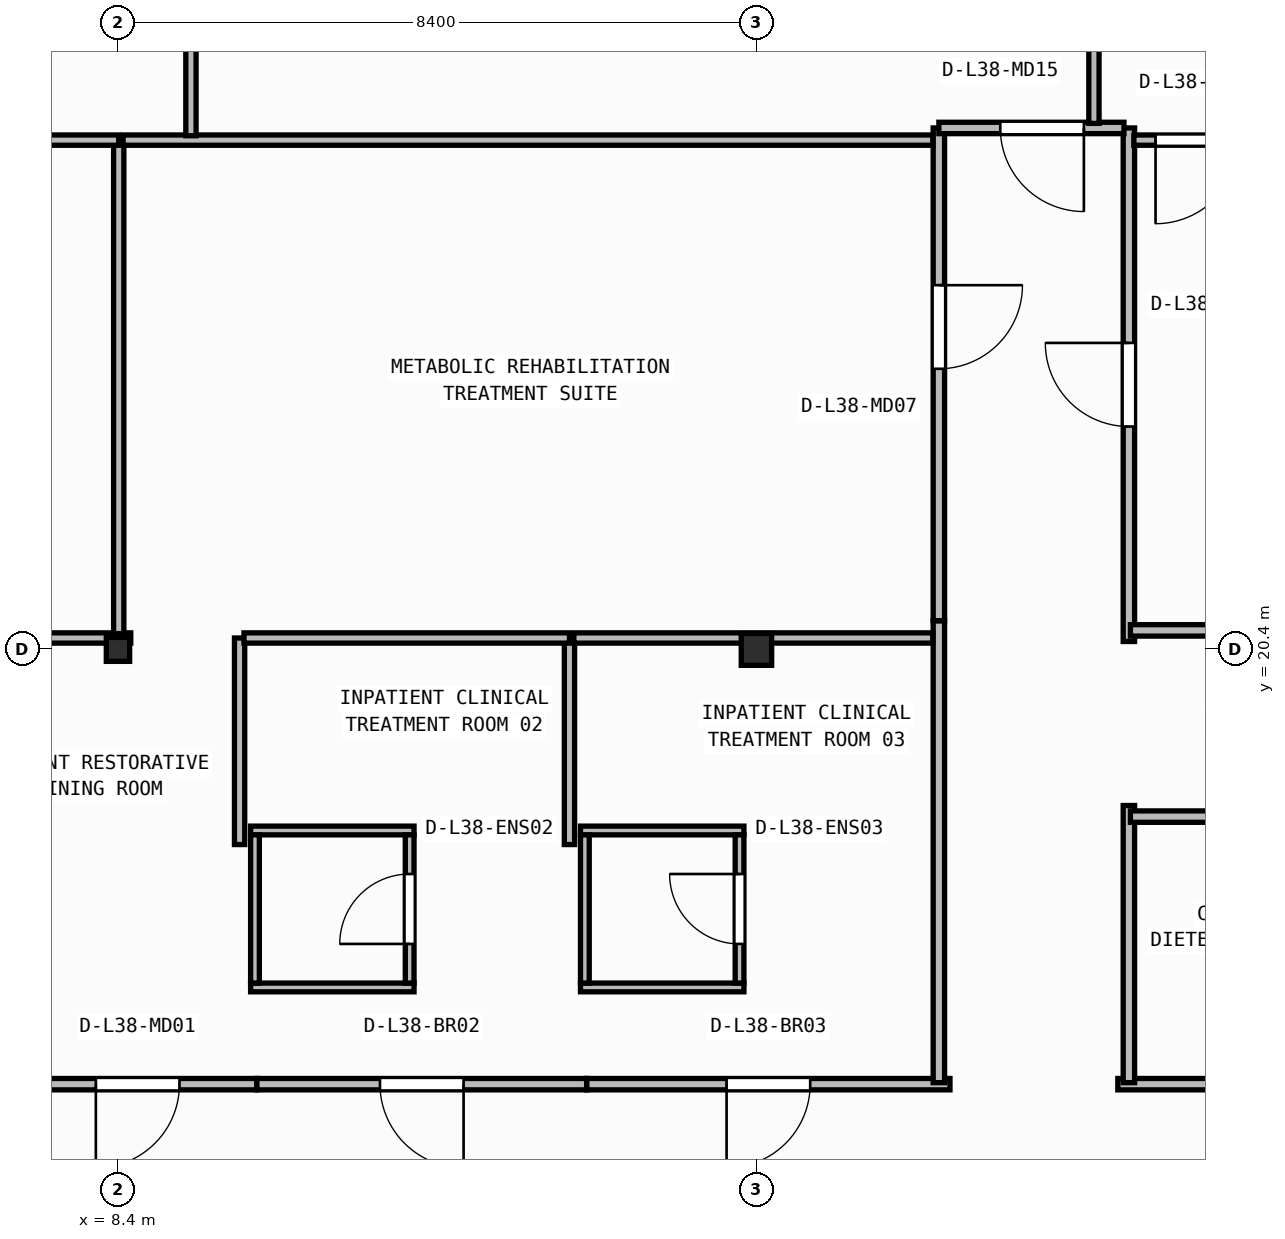
"""IFC4 building model, lengths in metres.
Left out: names, types, materials, properties, quantities, classifications, styles, units other than length and angle.
Written with IfcOpenShell. Run it as: python <this file> out.ifc"""

import sys

from ifc_helpers import new_model, si_unit, direction, frame, frame_2d, origin, origin_2d, place, context, subcontext, project, spatial, rectangle, i_section, extrude, element, fill, save


model = new_model("IFC4")
c1 = context("Model", 3, precision=1e-05, world=origin(), true_north=direction((0.0, 1.0)))
c2 = subcontext(c1, "Body", "Model", "MODEL_VIEW")
j1 = project(units=[si_unit("LENGTHUNIT", "METRE"), si_unit("PLANEANGLEUNIT", "RADIAN")], contexts=[c1])
p1 = place(None, origin())
s1 = spatial("IfcSite", under=j1, at=p1, CompositionType="ELEMENT")
p2 = place(p1, origin())
s2 = spatial("IfcBuilding", under=s1, at=p2, CompositionType="ELEMENT")
p3 = place(p2, frame((0.0, 0.0, 154.7)))
s3 = spatial("IfcBuildingStorey", under=s2, at=p3, CompositionType="ELEMENT", Elevation=154.7)
p4 = place(p3, frame((8.4, 20.4, 0.0), z_axis=(0.0, 0.0, 1.0), x_axis=(1.0, 0.0, 0.0)))
e1 = element("IfcColumn", 1, at=p4, inside=s3, PredefinedType="COLUMN", context=c2, shape_type="SweptSolid", body=[
    extrude(i_section(OverallWidth=0.307, OverallDepth=0.315, WebThickness=0.012, FlangeThickness=0.019, FilletRadius=0.017, at=origin_2d()), origin(), (0.0, 0.0, 1.0), 3.95),
])
p5 = place(p3, frame((16.8, 20.4, 0.0), z_axis=(0.0, 0.0, 1.0), x_axis=(1.0, 0.0, 0.0)))
e2 = element("IfcColumn", 2, at=p5, inside=s3, PredefinedType="COLUMN", context=c2, shape_type="SweptSolid", body=[
    extrude(i_section(OverallWidth=0.4, OverallDepth=0.42, WebThickness=0.025, FlangeThickness=0.04, at=origin_2d()), origin(), (0.0, 0.0, 1.0), 3.95),
])
for number, where, z_axis, x_axis in (
    (3, (10.145, 15.952, 0.0), (0.0, 0.0, 1.0), (1.0, 0.0, 0.0)),
    (4, (10.145, 18.018, 0.0), (0.0, 0.0, 1.0), (1.0, 0.0, 0.0)),
):
    element("IfcWall", number, at=place(p3, frame(where, z_axis=z_axis, x_axis=x_axis)), inside=s3, PredefinedType="PARTITIONING", context=c2, shape_type="SweptSolid", body=[
        extrude(rectangle(XDim=2.15, YDim=0.115, at=frame_2d((1.075, 0.0))), origin(), (0.0, 0.0, 1.0), 3.71),
    ])
p6 = place(p3, frame((10.202, 16.01, 0.0), z_axis=(0.0, 0.0, 1.0), x_axis=(0.0, 1.0, 0.0)))
e5 = element("IfcWall", 5, at=p6, inside=s3, PredefinedType="PARTITIONING", context=c2, shape_type="SweptSolid", body=[
    extrude(rectangle(XDim=1.95, YDim=0.115, at=frame_2d((0.975, 0.0))), origin(), (0.0, 0.0, 1.0), 3.71),
])
p7 = place(p3, frame((12.238, 16.01, 0.0), z_axis=(0.0, 0.0, 1.0), x_axis=(0.0, 1.0, 0.0)))
e6 = element("IfcWall", 6, at=p7, inside=s3, PredefinedType="PARTITIONING", context=c2, shape_type="SweptSolid", body=[
    extrude(rectangle(XDim=1.95, YDim=0.115, at=frame_2d((0.975, 0.0))), origin(), (0.0, 0.0, 1.0), 3.71),
])
p8 = place(p7, frame((0.515, 0.0, 0.0)))
e7 = element("IfcOpeningElement", 7, at=p8, cuts=e6, PredefinedType="OPENING", context=c2, shape_type="SweptSolid", body=[
    extrude(rectangle(XDim=0.92, YDim=2.1, at=frame_2d((0.46, 1.05))), frame((0.0, 0.067, 0.0), z_axis=(0.0, -1.0, 0.0), x_axis=(1.0, 0.0, 0.0)), (0.0, 0.0, 1.0), 0.135),
])
for number, where, z_axis, x_axis in (
    (8, (14.485, 15.952, 0.0), (0.0, 0.0, 1.0), (1.0, 0.0, 0.0)),
    (9, (14.485, 18.018, 0.0), (0.0, 0.0, 1.0), (1.0, 0.0, 0.0)),
):
    element("IfcWall", number, at=place(p3, frame(where, z_axis=z_axis, x_axis=x_axis)), inside=s3, PredefinedType="PARTITIONING", context=c2, shape_type="SweptSolid", body=[
        extrude(rectangle(XDim=2.15, YDim=0.115, at=frame_2d((1.075, 0.0))), origin(), (0.0, 0.0, 1.0), 3.71),
    ])
p9 = place(p3, frame((14.542, 16.01, 0.0), z_axis=(0.0, 0.0, 1.0), x_axis=(0.0, 1.0, 0.0)))
e10 = element("IfcWall", 10, at=p9, inside=s3, PredefinedType="PARTITIONING", context=c2, shape_type="SweptSolid", body=[
    extrude(rectangle(XDim=1.95, YDim=0.115, at=frame_2d((0.975, 0.0))), origin(), (0.0, 0.0, 1.0), 3.71),
])
p10 = place(p3, frame((16.577, 16.01, 0.0), z_axis=(0.0, 0.0, 1.0), x_axis=(0.0, 1.0, 0.0)))
e11 = element("IfcWall", 11, at=p10, inside=s3, PredefinedType="PARTITIONING", context=c2, shape_type="SweptSolid", body=[
    extrude(rectangle(XDim=1.95, YDim=0.115, at=frame_2d((0.975, 0.0))), origin(), (0.0, 0.0, 1.0), 3.71),
])
p11 = place(p10, frame((0.515, 0.0, 0.0)))
e12 = element("IfcOpeningElement", 12, at=p11, cuts=e11, PredefinedType="OPENING", context=c2, shape_type="SweptSolid", body=[
    extrude(rectangle(XDim=0.92, YDim=2.1, at=frame_2d((0.46, 1.05))), frame((0.0, 0.067, 0.0), z_axis=(0.0, -1.0, 0.0), x_axis=(1.0, 0.0, 0.0)), (0.0, 0.0, 1.0), 0.135),
])
p12 = place(p3, frame((10.226, 14.68, 0.0), z_axis=(0.0, 0.0, 1.0), x_axis=(-1.0, 0.0, 0.0)))
e13 = element("IfcWall", 13, at=p12, inside=s3, PredefinedType="PARTITIONING", context=c2, shape_type="SweptSolid", body=[
    extrude(rectangle(XDim=3.134, YDim=0.15, at=frame_2d((1.567, 0.0))), origin(), (0.0, 0.0, 1.0), 3.71),
])
p13 = place(p12, frame((1.017, 0.0, 0.0)))
e14 = element("IfcOpeningElement", 14, at=p13, cuts=e13, PredefinedType="OPENING", context=c2, shape_type="SweptSolid", body=[
    extrude(rectangle(XDim=1.1, YDim=2.1, at=frame_2d((0.55, 1.05))), frame((0.0, 0.085, 0.0), z_axis=(0.0, -1.0, 0.0), x_axis=(1.0, 0.0, 0.0)), (0.0, 0.0, 1.0), 0.17),
])
p14 = place(p3, frame((14.566, 14.68, 0.0), z_axis=(0.0, 0.0, 1.0), x_axis=(-1.0, 0.0, 0.0)))
e15 = element("IfcWall", 15, at=p14, inside=s3, PredefinedType="PARTITIONING", context=c2, shape_type="SweptSolid", body=[
    extrude(rectangle(XDim=4.338, YDim=0.15, at=frame_2d((2.169, 0.0))), origin(), (0.0, 0.0, 1.0), 3.71),
])
p15 = place(p14, frame((1.619, 0.0, 0.0)))
e16 = element("IfcOpeningElement", 16, at=p15, cuts=e15, PredefinedType="OPENING", context=c2, shape_type="SweptSolid", body=[
    extrude(rectangle(XDim=1.1, YDim=2.1, at=frame_2d((0.55, 1.05))), frame((0.0, 0.085, 0.0), z_axis=(0.0, -1.0, 0.0), x_axis=(1.0, 0.0, 0.0)), (0.0, 0.0, 1.0), 0.17),
])
p16 = place(p3, frame((19.346, 14.68, 0.0), z_axis=(0.0, 0.0, 1.0), x_axis=(-1.0, 0.0, 0.0)))
e17 = element("IfcWall", 17, at=p16, inside=s3, PredefinedType="PARTITIONING", context=c2, shape_type="SweptSolid", body=[
    extrude(rectangle(XDim=4.778, YDim=0.15, at=frame_2d((2.389, 0.0))), origin(), (0.0, 0.0, 1.0), 3.71),
])
p17 = place(p16, frame((1.839, 0.0, 0.0)))
e18 = element("IfcOpeningElement", 18, at=p17, cuts=e17, PredefinedType="OPENING", context=c2, shape_type="SweptSolid", body=[
    extrude(rectangle(XDim=1.1, YDim=2.1, at=frame_2d((0.55, 1.05))), frame((0.0, 0.085, 0.0), z_axis=(0.0, -1.0, 0.0), x_axis=(1.0, 0.0, 0.0)), (0.0, 0.0, 1.0), 0.17),
])
p18 = place(p3, frame((29.806, 14.68, 0.0), z_axis=(0.0, 0.0, 1.0), x_axis=(-1.0, 0.0, 0.0)))
e19 = element("IfcWall", 19, at=p18, inside=s3, PredefinedType="PARTITIONING", context=c2, shape_type="SweptSolid", body=[
    extrude(rectangle(XDim=8.252, YDim=0.15, at=frame_2d((4.126, 0.0))), origin(), (0.0, 0.0, 1.0), 3.71),
])
p19 = place(p18, frame((3.576, 0.0, 0.0)))
e20 = element("IfcOpeningElement", 20, at=p19, cuts=e19, PredefinedType="OPENING", context=c2, shape_type="SweptSolid", body=[
    extrude(rectangle(XDim=1.1, YDim=2.1, at=frame_2d((0.55, 1.05))), frame((0.0, 0.085, 0.0), z_axis=(0.0, -1.0, 0.0), x_axis=(1.0, 0.0, 0.0)), (0.0, 0.0, 1.0), 0.17),
])
p20 = place(p3, frame((19.2, 20.776, 0.0), z_axis=(0.0, 0.0, 1.0), x_axis=(0.0, -1.0, 0.0)))
e21 = element("IfcWall", 21, at=p20, inside=s3, PredefinedType="PARTITIONING", context=c2, shape_type="SweptSolid", body=[
    extrude(rectangle(XDim=6.076, YDim=0.15, at=frame_2d((3.038, 0.0))), origin(), (0.0, 0.0, 1.0), 3.71),
])
p21 = place(p3, frame((21.7, 14.7, 0.0), z_axis=(0.0, 0.0, 1.0), x_axis=(0.0, 1.0, 0.0)))
e22 = element("IfcWall", 22, at=p21, inside=s3, PredefinedType="PARTITIONING", context=c2, shape_type="SweptSolid", body=[
    extrude(rectangle(XDim=3.646, YDim=0.15, at=frame_2d((1.823, 0.0))), origin(), (0.0, 0.0, 1.0), 3.71),
])
p22 = place(p3, frame((19.2, 27.26, 0.0), z_axis=(0.0, 0.0, 1.0), x_axis=(0.0, -1.0, 0.0)))
e23 = element("IfcWall", 23, at=p22, inside=s3, PredefinedType="PARTITIONING", context=c2, shape_type="SweptSolid", body=[
    extrude(rectangle(XDim=6.482, YDim=0.15, at=frame_2d((3.241, 0.0))), origin(), (0.0, 0.0, 1.0), 3.71),
])
p23 = place(p22, frame((2.068, 0.0, 0.0)))
e24 = element("IfcOpeningElement", 24, at=p23, cuts=e23, PredefinedType="OPENING", context=c2, shape_type="SweptSolid", body=[
    extrude(rectangle(XDim=1.1, YDim=2.1, at=frame_2d((0.55, 1.05))), frame((0.0, 0.085, 0.0), z_axis=(0.0, -1.0, 0.0), x_axis=(1.0, 0.0, 0.0)), (0.0, 0.0, 1.0), 0.17),
])
p24 = place(p3, frame((21.7, 20.504, 0.0), z_axis=(0.0, 0.0, 1.0), x_axis=(0.0, 1.0, 0.0)))
e25 = element("IfcWall", 25, at=p24, inside=s3, PredefinedType="PARTITIONING", context=c2, shape_type="SweptSolid", body=[
    extrude(rectangle(XDim=6.756, YDim=0.15, at=frame_2d((3.378, 0.0))), origin(), (0.0, 0.0, 1.0), 3.71),
])
p25 = place(p24, frame((2.828, 0.0, 0.0)))
e26 = element("IfcOpeningElement", 26, at=p25, cuts=e25, PredefinedType="OPENING", context=c2, shape_type="SweptSolid", body=[
    extrude(rectangle(XDim=1.1, YDim=2.1, at=frame_2d((0.55, 1.05))), frame((0.0, 0.085, 0.0), z_axis=(0.0, -1.0, 0.0), x_axis=(1.0, 0.0, 0.0)), (0.0, 0.0, 1.0), 0.17),
])
p26 = place(p3, frame((21.635, 27.26, 0.0), z_axis=(0.0, 0.0, 1.0), x_axis=(-1.0, 0.0, 0.0)))
e27 = element("IfcWall", 27, at=p26, inside=s3, PredefinedType="PARTITIONING", context=c2, shape_type="SweptSolid", body=[
    extrude(rectangle(XDim=2.435, YDim=0.15, at=frame_2d((1.218, 0.0))), origin(), (0.0, 0.0, 1.0), 3.71),
])
p27 = place(p26, frame((0.527, 0.0, 0.0)))
e28 = element("IfcOpeningElement", 28, at=p27, cuts=e27, PredefinedType="OPENING", context=c2, shape_type="SweptSolid", body=[
    extrude(rectangle(XDim=1.1, YDim=2.1, at=frame_2d((0.55, 1.05))), frame((0.0, 0.085, 0.0), z_axis=(0.0, -1.0, 0.0), x_axis=(1.0, 0.0, 0.0)), (0.0, 0.0, 1.0), 0.17),
])
p28 = place(p3, frame((21.72, 18.2, 0.0), z_axis=(0.0, 0.0, 1.0), x_axis=(1.0, 0.0, 0.0)))
e29 = element("IfcWall", 29, at=p28, inside=s3, PredefinedType="PARTITIONING", context=c2, shape_type="SweptSolid", body=[
    extrude(rectangle(XDim=8.086, YDim=0.15, at=frame_2d((4.043, 0.0))), origin(), (0.0, 0.0, 1.0), 3.71),
])
p29 = place(p3, frame((26.916, 20.65, 0.0), z_axis=(0.0, 0.0, 1.0), x_axis=(-1.0, 0.0, 0.0)))
e30 = element("IfcWall", 30, at=p29, inside=s3, PredefinedType="PARTITIONING", context=c2, shape_type="SweptSolid", body=[
    extrude(rectangle(XDim=5.196, YDim=0.15, at=frame_2d((2.598, 0.0))), origin(), (0.0, 0.0, 1.0), 3.083),
])
p30 = place(p3, frame((10.0, 17.833, 0.0), z_axis=(0.0, 0.0, 1.0), x_axis=(0.0, 1.0, 0.0)))
e31 = element("IfcWall", 31, at=p30, inside=s3, PredefinedType="PARTITIONING", context=c2, shape_type="SweptSolid", body=[
    extrude(rectangle(XDim=2.718, YDim=0.135, at=frame_2d((1.359, 0.0))), origin(), (0.0, 0.0, 1.0), 3.71),
])
p31 = place(p3, frame((8.568, 20.55, 0.0), z_axis=(0.0, 0.0, 1.0), x_axis=(-1.0, 0.0, 0.0)))
e32 = element("IfcWall", 32, at=p31, inside=s3, PredefinedType="PARTITIONING", context=c2, shape_type="SweptSolid", body=[
    extrude(rectangle(XDim=3.611, YDim=0.135, at=frame_2d((1.805, 0.0))), origin(), (0.0, 0.0, 1.0), 3.083),
])
p32 = place(p3, frame((14.34, 17.833, 0.0), z_axis=(0.0, 0.0, 1.0), x_axis=(0.0, 1.0, 0.0)))
e33 = element("IfcWall", 33, at=p32, inside=s3, PredefinedType="PARTITIONING", context=c2, shape_type="SweptSolid", body=[
    extrude(rectangle(XDim=2.718, YDim=0.135, at=frame_2d((1.359, 0.0))), origin(), (0.0, 0.0, 1.0), 3.71),
])
p33 = place(p3, frame((14.34, 20.55, 0.0), z_axis=(0.0, 0.0, 1.0), x_axis=(-1.0, 0.0, 0.0)))
e34 = element("IfcWall", 34, at=p33, inside=s3, PredefinedType="PARTITIONING", context=c2, shape_type="SweptSolid", body=[
    extrude(rectangle(XDim=4.282, YDim=0.135, at=frame_2d((2.141, 0.0))), origin(), (0.0, 0.0, 1.0), 3.083),
])
p34 = place(p3, frame((19.12, 20.55, 0.0), z_axis=(0.0, 0.0, 1.0), x_axis=(-1.0, 0.0, 0.0)))
e35 = element("IfcWall", 35, at=p34, inside=s3, PredefinedType="PARTITIONING", context=c2, shape_type="SweptSolid", body=[
    extrude(rectangle(XDim=4.723, YDim=0.135, at=frame_2d((2.361, 0.0))), origin(), (0.0, 0.0, 1.0), 3.083),
])
p35 = place(p3, frame((8.41, 20.607, 0.0), z_axis=(0.0, 0.0, 1.0), x_axis=(0.0, 1.0, 0.0)))
e36 = element("IfcWall", 36, at=p35, inside=s3, PredefinedType="PARTITIONING", context=c2, shape_type="SweptSolid", body=[
    extrude(rectangle(XDim=6.493, YDim=0.135, at=frame_2d((3.246, 0.0))), origin(), (0.0, 0.0, 1.0), 3.152),
])
p36 = place(p3, frame((8.41, 27.1, 0.0), z_axis=(0.0, 0.0, 1.0), x_axis=(-1.0, 0.0, 0.0)))
e37 = element("IfcWall", 37, at=p36, inside=s3, PredefinedType="PARTITIONING", context=c2, shape_type="SweptSolid", body=[
    extrude(rectangle(XDim=8.17, YDim=0.135, at=frame_2d((4.085, 0.0))), origin(), (0.0, 0.0, 1.0), 3.71),
])
p37 = place(p36, frame((3.035, 0.0, 0.0)))
e38 = element("IfcOpeningElement", 38, at=p37, cuts=e37, PredefinedType="OPENING", context=c2, shape_type="SweptSolid", body=[
    extrude(rectangle(XDim=1.1, YDim=2.1, at=frame_2d((0.55, 1.05))), frame((0.0, 0.077, 0.0), z_axis=(0.0, -1.0, 0.0), x_axis=(1.0, 0.0, 0.0)), (0.0, 0.0, 1.0), 0.155),
])
p38 = place(p3, frame((19.12, 27.1, 0.0), z_axis=(0.0, 0.0, 1.0), x_axis=(-1.0, 0.0, 0.0)))
e39 = element("IfcWall", 39, at=p38, inside=s3, PredefinedType="PARTITIONING", context=c2, shape_type="SweptSolid", body=[
    extrude(rectangle(XDim=10.653, YDim=0.135, at=frame_2d((5.326, 0.0))), origin(), (0.0, 0.0, 1.0), 3.71),
])
p39 = place(p3, frame((26.69, 27.1, 0.0), z_axis=(0.0, 0.0, 1.0), x_axis=(-1.0, 0.0, 0.0)))
e40 = element("IfcWall", 40, at=p39, inside=s3, PredefinedType="PARTITIONING", context=c2, shape_type="SweptSolid", body=[
    extrude(rectangle(XDim=4.925, YDim=0.135, at=frame_2d((2.462, 0.0))), origin(), (0.0, 0.0, 1.0), 3.71),
])
p40 = place(p39, frame((3.539, 0.0, 0.0)))
e41 = element("IfcOpeningElement", 41, at=p40, cuts=e40, PredefinedType="OPENING", context=c2, shape_type="SweptSolid", body=[
    extrude(rectangle(XDim=1.1, YDim=2.1, at=frame_2d((0.55, 1.05))), frame((0.0, 0.077, 0.0), z_axis=(0.0, -1.0, 0.0), x_axis=(1.0, 0.0, 0.0)), (0.0, 0.0, 1.0), 0.155),
])
p41 = place(p3, frame((9.36, 27.157, 0.0), z_axis=(0.0, 0.0, 1.0), x_axis=(0.0, 1.0, 0.0)))
e42 = element("IfcWall", 42, at=p41, inside=s3, PredefinedType="PARTITIONING", context=c2, shape_type="SweptSolid", body=[
    extrude(rectangle(XDim=11.572, YDim=0.135, at=frame_2d((5.786, 0.0))), origin(), (0.0, 0.0, 1.0), 3.71),
])
p42 = place(p3, frame((21.24, 27.32, 0.0), z_axis=(0.0, 0.0, 1.0), x_axis=(0.0, 1.0, 0.0)))
e43 = element("IfcWall", 43, at=p42, inside=s3, PredefinedType="PARTITIONING", context=c2, shape_type="SweptSolid", body=[
    extrude(rectangle(XDim=5.576, YDim=0.135, at=frame_2d((2.788, 0.0))), origin(), (0.0, 0.0, 1.0), 3.71),
])
p43 = place(p8, origin())
e44 = element("IfcDoor", 44, at=p43, inside=s3, OperationType="SINGLE_SWING_LEFT", PredefinedType="DOOR", context=c2, shape_type="SweptSolid", body=[
    extrude(rectangle(XDim=0.92, YDim=2.1, at=frame_2d((0.46, 1.05))), frame((0.0, 0.025, 0.0), z_axis=(0.0, -1.0, 0.0), x_axis=(1.0, 0.0, 0.0)), (0.0, 0.0, 1.0), 0.05),
])
fill(e7, e44)
p44 = place(p11, origin())
e45 = element("IfcDoor", 45, at=p44, inside=s3, OperationType="SINGLE_SWING_RIGHT", PredefinedType="DOOR", context=c2, shape_type="SweptSolid", body=[
    extrude(rectangle(XDim=0.92, YDim=2.1, at=frame_2d((0.46, 1.05))), frame((0.0, 0.025, 0.0), z_axis=(0.0, -1.0, 0.0), x_axis=(1.0, 0.0, 0.0)), (0.0, 0.0, 1.0), 0.05),
])
fill(e12, e45)
p45 = place(p13, origin())
e46 = element("IfcDoor", 46, at=p45, inside=s3, OperationType="SINGLE_SWING_RIGHT", PredefinedType="DOOR", context=c2, shape_type="SweptSolid", body=[
    extrude(rectangle(XDim=1.1, YDim=2.1, at=frame_2d((0.55, 1.05))), frame((0.0, 0.025, 0.0), z_axis=(0.0, -1.0, 0.0), x_axis=(1.0, 0.0, 0.0)), (0.0, 0.0, 1.0), 0.05),
])
fill(e14, e46)
p46 = place(p15, origin())
e47 = element("IfcDoor", 47, at=p46, inside=s3, OperationType="SINGLE_SWING_LEFT", PredefinedType="DOOR", context=c2, shape_type="SweptSolid", body=[
    extrude(rectangle(XDim=1.1, YDim=2.1, at=frame_2d((0.55, 1.05))), frame((0.0, 0.025, 0.0), z_axis=(0.0, -1.0, 0.0), x_axis=(1.0, 0.0, 0.0)), (0.0, 0.0, 1.0), 0.05),
])
fill(e16, e47)
p47 = place(p17, origin())
e48 = element("IfcDoor", 48, at=p47, inside=s3, OperationType="SINGLE_SWING_RIGHT", PredefinedType="DOOR", context=c2, shape_type="SweptSolid", body=[
    extrude(rectangle(XDim=1.1, YDim=2.1, at=frame_2d((0.55, 1.05))), frame((0.0, 0.025, 0.0), z_axis=(0.0, -1.0, 0.0), x_axis=(1.0, 0.0, 0.0)), (0.0, 0.0, 1.0), 0.05),
])
fill(e18, e48)
p48 = place(p23, origin())
e49 = element("IfcDoor", 49, at=p48, inside=s3, OperationType="SINGLE_SWING_LEFT", PredefinedType="DOOR", context=c2, shape_type="SweptSolid", body=[
    extrude(rectangle(XDim=1.1, YDim=2.1, at=frame_2d((0.55, 1.05))), frame((0.0, 0.025, 0.0), z_axis=(0.0, -1.0, 0.0), x_axis=(1.0, 0.0, 0.0)), (0.0, 0.0, 1.0), 0.05),
])
fill(e24, e49)
p49 = place(p25, origin())
e50 = element("IfcDoor", 50, at=p49, inside=s3, OperationType="SINGLE_SWING_RIGHT", PredefinedType="DOOR", context=c2, shape_type="SweptSolid", body=[
    extrude(rectangle(XDim=1.1, YDim=2.1, at=frame_2d((0.55, 1.05))), frame((0.0, 0.025, 0.0), z_axis=(0.0, -1.0, 0.0), x_axis=(1.0, 0.0, 0.0)), (0.0, 0.0, 1.0), 0.05),
])
fill(e26, e50)
p50 = place(p27, origin())
e51 = element("IfcDoor", 51, at=p50, inside=s3, OperationType="SINGLE_SWING_LEFT", PredefinedType="DOOR", context=c2, shape_type="SweptSolid", body=[
    extrude(rectangle(XDim=1.1, YDim=2.1, at=frame_2d((0.55, 1.05))), frame((0.0, 0.025, 0.0), z_axis=(0.0, -1.0, 0.0), x_axis=(1.0, 0.0, 0.0)), (0.0, 0.0, 1.0), 0.05),
])
fill(e28, e51)
p51 = place(p40, origin())
e52 = element("IfcDoor", 52, at=p51, inside=s3, OperationType="SINGLE_SWING_RIGHT", PredefinedType="DOOR", context=c2, shape_type="SweptSolid", body=[
    extrude(rectangle(XDim=1.1, YDim=2.1, at=frame_2d((0.55, 1.05))), frame((0.0, 0.025, 0.0), z_axis=(0.0, -1.0, 0.0), x_axis=(1.0, 0.0, 0.0)), (0.0, 0.0, 1.0), 0.05),
])
fill(e41, e52)
save(model, sys.argv[1])
